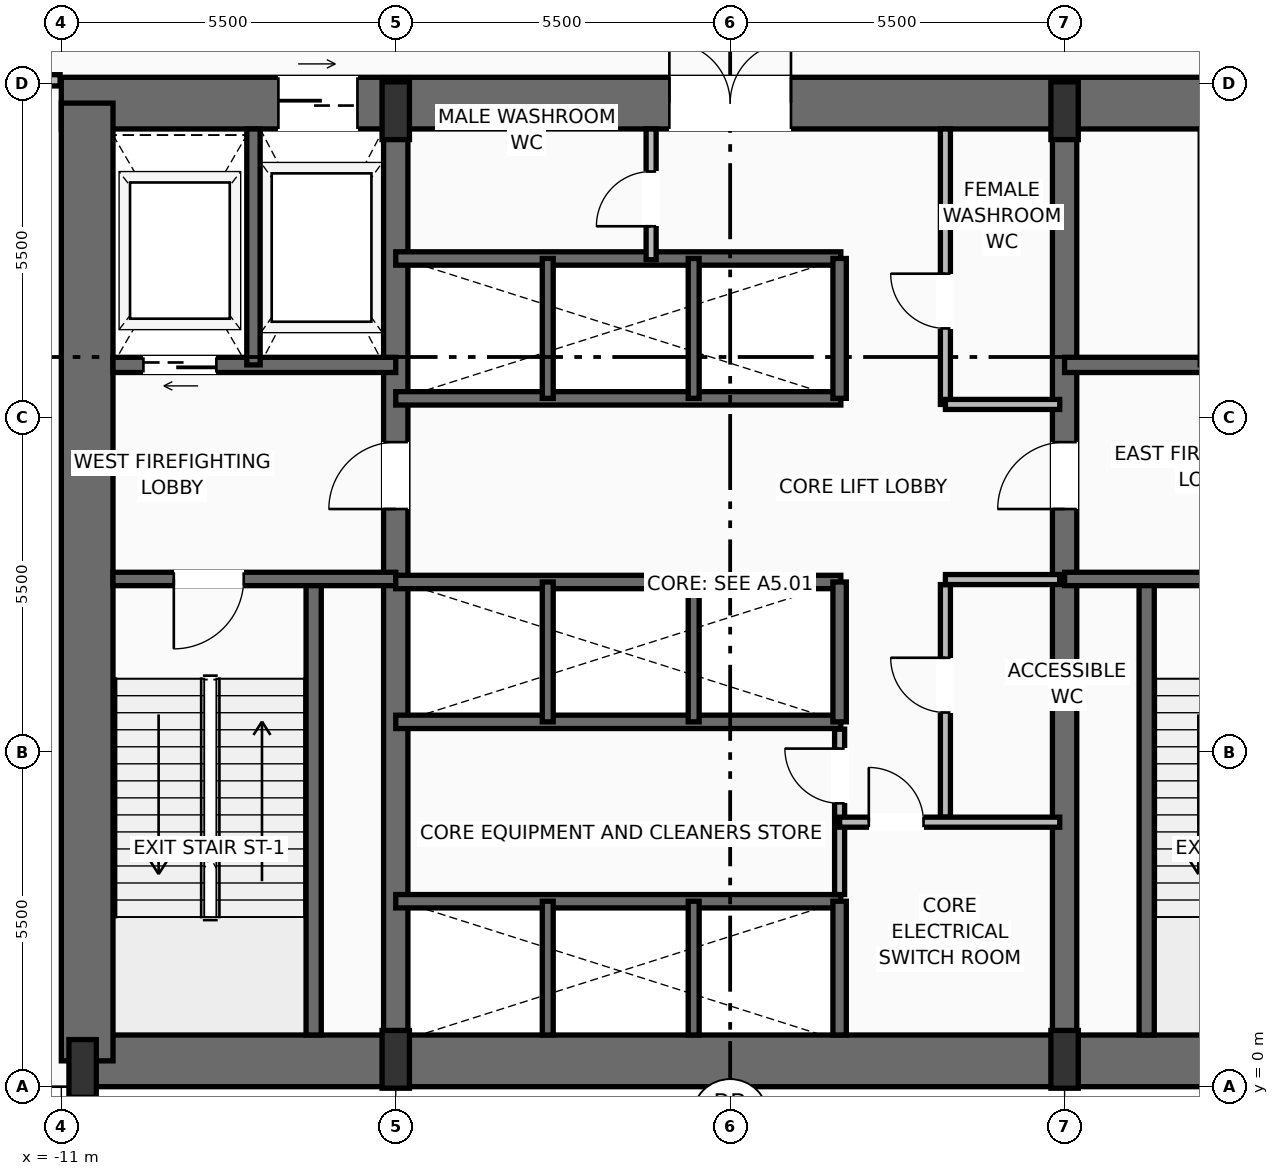
"""IFC4 building model, lengths in metres.
Left out: names, types, materials, properties, quantities, classifications, styles, units other than length and angle.
Written with IfcOpenShell. Run it as: python <this file> out.ifc"""

import sys

from ifc_helpers import new_model, si_unit, direction, frame, frame_2d, origin, origin_2d, place, context, subcontext, project, spatial, rectangle, extrude, source, transform, mapped, element, fill, save


model = new_model("IFC4")
c1 = context("Model", 3, precision=1e-05, world=origin(), true_north=direction((0.0, 1.0)))
c2 = subcontext(c1, "Body", "Model", "MODEL_VIEW")
j1 = project(units=[si_unit("LENGTHUNIT", "METRE"), si_unit("PLANEANGLEUNIT", "RADIAN")], contexts=[c1])
p1 = place(None, origin())
s1 = spatial("IfcSite", under=j1, at=p1, CompositionType="ELEMENT")
p2 = place(p1, origin())
s2 = spatial("IfcBuilding", under=s1, at=p2, CompositionType="ELEMENT")
p3 = place(p2, frame((0.0, 0.0, -5.0)))
s3 = spatial("IfcBuildingStorey", under=s2, at=p3, CompositionType="ELEMENT", Elevation=-5.0)
p4 = place(p3, frame((-10.65, 0.425, 0.0), z_axis=(0.0, 0.0, 1.0), x_axis=(1.0, 0.0, 0.0)))
e1 = element("IfcWall", 1, at=p4, inside=s3, PredefinedType="SHEAR", context=c2, shape_type="SweptSolid", body=[
    extrude(rectangle(XDim=21.3, YDim=0.85, at=frame_2d((10.65, 0.0))), origin(), (0.0, 0.0, 1.0), 4.64),
])
p5 = place(p3, frame((-11.0, 16.175, 0.0), z_axis=(0.0, 0.0, 1.0), x_axis=(1.0, 0.0, 0.0)))
e2 = element("IfcWall", 2, at=p5, inside=s3, PredefinedType="SHEAR", context=c2, shape_type="SweptSolid", body=[
    extrude(rectangle(XDim=22.0, YDim=0.85, at=frame_2d((11.0, 0.0))), origin(), (0.0, 0.0, 1.0), 4.64),
])
p6 = place(p5, frame((3.57, 0.0, 0.0)))
e3 = element("IfcOpeningElement", 3, at=p6, cuts=e2, PredefinedType="OPENING", context=c2, shape_type="SweptSolid", body=[
    extrude(rectangle(XDim=1.3, YDim=2.3, at=frame_2d((0.65, 1.15))), frame((0.0, 0.435, 0.0), z_axis=(0.0, -1.0, 0.0), x_axis=(1.0, 0.0, 0.0)), (0.0, 0.0, 1.0), 0.87),
])
p7 = place(p5, frame((10.0, 0.0, 0.0)))
e4 = element("IfcOpeningElement", 4, at=p7, cuts=e2, PredefinedType="OPENING", context=c2, shape_type="SweptSolid", body=[
    extrude(rectangle(XDim=2.0, YDim=2.4, at=frame_2d((1.0, 1.2))), frame((0.0, 0.435, 0.0), z_axis=(0.0, -1.0, 0.0), x_axis=(1.0, 0.0, 0.0)), (0.0, 0.0, 1.0), 0.87),
])
p8 = place(p3, frame((-10.575, 0.425, 0.0), z_axis=(0.0, 0.0, 1.0), x_axis=(0.0, 1.0, 0.0)))
e5 = element("IfcWall", 5, at=p8, inside=s3, PredefinedType="SHEAR", context=c2, shape_type="SweptSolid", body=[
    extrude(rectangle(XDim=15.75, YDim=0.85, at=frame_2d((7.875, 0.0))), origin(), (0.0, 0.0, 1.0), 4.64),
])
p9 = place(p3, frame((-5.5, 0.425, 0.0), z_axis=(0.0, 0.0, 1.0), x_axis=(0.0, 1.0, 0.0)))
e6 = element("IfcWall", 6, at=p9, inside=s3, PredefinedType="SHEAR", context=c2, shape_type="SweptSolid", body=[
    extrude(rectangle(XDim=15.75, YDim=0.4, at=frame_2d((7.875, 0.0))), origin(), (0.0, 0.0, 1.0), 4.64),
])
p10 = place(p9, frame((9.075, 0.0, 0.0)))
e7 = element("IfcOpeningElement", 7, at=p10, cuts=e6, PredefinedType="OPENING", context=c2, shape_type="SweptSolid", body=[
    extrude(rectangle(XDim=1.1, YDim=2.2, at=frame_2d((0.55, 1.1))), frame((0.0, 0.21, 0.0), z_axis=(0.0, -1.0, 0.0), x_axis=(1.0, 0.0, 0.0)), (0.0, 0.0, 1.0), 0.42),
])
p11 = place(p3, frame((5.5, 0.425, 0.0), z_axis=(0.0, 0.0, 1.0), x_axis=(0.0, 1.0, 0.0)))
e8 = element("IfcWall", 8, at=p11, inside=s3, PredefinedType="SHEAR", context=c2, shape_type="SweptSolid", body=[
    extrude(rectangle(XDim=15.75, YDim=0.4, at=frame_2d((7.875, 0.0))), origin(), (0.0, 0.0, 1.0), 4.64),
])
p12 = place(p11, frame((9.075, 0.0, 0.0)))
e9 = element("IfcOpeningElement", 9, at=p12, cuts=e8, PredefinedType="OPENING", context=c2, shape_type="SweptSolid", body=[
    extrude(rectangle(XDim=1.1, YDim=2.2, at=frame_2d((0.55, 1.1))), frame((0.0, 0.21, 0.0), z_axis=(0.0, -1.0, 0.0), x_axis=(1.0, 0.0, 0.0)), (0.0, 0.0, 1.0), 0.42),
])
m1 = source(origin(), c2, "Body", "SweptSolid", [
    extrude(rectangle(XDim=0.45, YDim=0.95, at=origin_2d()), origin(), (0.0, 0.0, 1.0), 5.0),
])
for number, where, z_axis, x_axis in (
    (10, (-10.65, 0.3, 0.0), (0.0, 0.0, 1.0), (1.0, 0.0, 0.0)),
    (11, (-5.5, 0.45, 0.0), (0.0, 0.0, 1.0), (1.0, 0.0, 0.0)),
    (12, (5.5, 0.45, 0.0), (0.0, 0.0, 1.0), (1.0, 0.0, 0.0)),
    (13, (-5.5, 16.05, 0.0), (0.0, 0.0, 1.0), (1.0, 0.0, 0.0)),
    (14, (5.5, 16.05, 0.0), (0.0, 0.0, 1.0), (1.0, 0.0, 0.0)),
):
    element("IfcColumn", number, at=place(p3, frame(where, z_axis=z_axis, x_axis=x_axis)), inside=s3, PredefinedType="PILASTER", context=c2, shape_type="MappedRepresentation", body=[
        mapped(m1, transform((0.0, 0.0, 0.0), scale=1.0)),
    ])
p13 = place(p3, frame((-6.85, 0.85, 0.0), z_axis=(0.0, 0.0, 1.0), x_axis=(0.0, 1.0, 0.0)))
e15 = element("IfcWall", 15, at=p13, inside=s3, PredefinedType="SOLIDWALL", context=c2, shape_type="SweptSolid", body=[
    extrude(rectangle(XDim=7.5, YDim=0.25, at=frame_2d((3.75, 0.0))), origin(), (0.0, 0.0, 1.0), 4.64),
])
p14 = place(p3, frame((-5.5, 8.35, 0.0), z_axis=(0.0, 0.0, 1.0), x_axis=(-1.0, 0.0, 0.0)))
e16 = element("IfcWall", 16, at=p14, inside=s3, PredefinedType="SOLIDWALL", context=c2, shape_type="SweptSolid", body=[
    extrude(rectangle(XDim=4.65, YDim=0.22, at=frame_2d((2.325, 0.0))), origin(), (0.0, 0.0, 1.0), 4.64),
])
p15 = place(p14, frame((2.5, 0.0, 0.0)))
e17 = element("IfcOpeningElement", 17, at=p15, cuts=e16, PredefinedType="OPENING", context=c2, shape_type="SweptSolid", body=[
    extrude(rectangle(XDim=1.15, YDim=2.2, at=frame_2d((0.575, 1.1))), frame((0.0, 0.12, 0.0), z_axis=(0.0, -1.0, 0.0), x_axis=(1.0, 0.0, 0.0)), (0.0, 0.0, 1.0), 0.24),
])
p16 = place(p3, frame((-5.5, 11.87, 0.0), z_axis=(0.0, 0.0, 1.0), x_axis=(-1.0, 0.0, 0.0)))
e18 = element("IfcWall", 18, at=p16, inside=s3, PredefinedType="SOLIDWALL", context=c2, shape_type="SweptSolid", body=[
    extrude(rectangle(XDim=4.65, YDim=0.25, at=frame_2d((2.325, 0.0))), origin(), (0.0, 0.0, 1.0), 4.64),
])
p17 = place(p16, frame((2.95, 0.0, 0.0)))
e19 = element("IfcOpeningElement", 19, at=p17, cuts=e18, PredefinedType="OPENING", context=c2, shape_type="SweptSolid", body=[
    extrude(rectangle(XDim=1.2, YDim=2.25, at=frame_2d((0.6, 1.125))), frame((0.0, 0.135, 0.0), z_axis=(0.0, -1.0, 0.0), x_axis=(1.0, 0.0, 0.0)), (0.0, 0.0, 1.0), 0.27),
])
p18 = place(p3, frame((-7.84, 11.87, 0.0), z_axis=(0.0, 0.0, 1.0), x_axis=(0.0, 1.0, 0.0)))
e20 = element("IfcWall", 20, at=p18, inside=s3, PredefinedType="SOLIDWALL", context=c2, shape_type="SweptSolid", body=[
    extrude(rectangle(XDim=3.88, YDim=0.22, at=frame_2d((1.94, 0.0))), origin(), (0.0, 0.0, 1.0), 4.64),
])
p19 = place(p3, frame((6.85, 0.85, 0.0), z_axis=(0.0, 0.0, 1.0), x_axis=(0.0, 1.0, 0.0)))
e21 = element("IfcWall", 21, at=p19, inside=s3, PredefinedType="SOLIDWALL", context=c2, shape_type="SweptSolid", body=[
    extrude(rectangle(XDim=7.5, YDim=0.25, at=frame_2d((3.75, 0.0))), origin(), (0.0, 0.0, 1.0), 4.64),
])
p20 = place(p3, frame((10.15, 8.35, 0.0), z_axis=(0.0, 0.0, 1.0), x_axis=(-1.0, 0.0, 0.0)))
e22 = element("IfcWall", 22, at=p20, inside=s3, PredefinedType="SOLIDWALL", context=c2, shape_type="SweptSolid", body=[
    extrude(rectangle(XDim=4.65, YDim=0.22, at=frame_2d((2.325, 0.0))), origin(), (0.0, 0.0, 1.0), 4.64),
])
p21 = place(p20, frame((1.0, 0.0, 0.0)))
e23 = element("IfcOpeningElement", 23, at=p21, cuts=e22, PredefinedType="OPENING", context=c2, shape_type="SweptSolid", body=[
    extrude(rectangle(XDim=1.15, YDim=2.2, at=frame_2d((0.575, 1.1))), frame((0.0, 0.12, 0.0), z_axis=(0.0, -1.0, 0.0), x_axis=(1.0, 0.0, 0.0)), (0.0, 0.0, 1.0), 0.24),
])
p22 = place(p3, frame((10.15, 11.87, 0.0), z_axis=(0.0, 0.0, 1.0), x_axis=(-1.0, 0.0, 0.0)))
e24 = element("IfcWall", 24, at=p22, inside=s3, PredefinedType="SOLIDWALL", context=c2, shape_type="SweptSolid", body=[
    extrude(rectangle(XDim=4.65, YDim=0.25, at=frame_2d((2.325, 0.0))), origin(), (0.0, 0.0, 1.0), 4.64),
])
p23 = place(p22, frame((0.5, 0.0, 0.0)))
e25 = element("IfcOpeningElement", 25, at=p23, cuts=e24, PredefinedType="OPENING", context=c2, shape_type="SweptSolid", body=[
    extrude(rectangle(XDim=1.2, YDim=2.25, at=frame_2d((0.6, 1.125))), frame((0.0, 0.135, 0.0), z_axis=(0.0, -1.0, 0.0), x_axis=(1.0, 0.0, 0.0)), (0.0, 0.0, 1.0), 0.27),
])
p24 = place(p3, frame((-5.5, 3.05, 0.0), z_axis=(0.0, 0.0, 1.0), x_axis=(1.0, 0.0, 0.0)))
e26 = element("IfcWall", 26, at=p24, inside=s3, PredefinedType="SOLIDWALL", context=c2, shape_type="SweptSolid", body=[
    extrude(rectangle(XDim=7.32, YDim=0.22, at=frame_2d((3.66, 0.0))), origin(), (0.0, 0.0, 1.0), 4.64),
])
p25 = place(p3, frame((1.8, 0.85, 0.0), z_axis=(0.0, 0.0, 1.0), x_axis=(0.0, 1.0, 0.0)))
e27 = element("IfcWall", 27, at=p25, inside=s3, PredefinedType="SOLIDWALL", context=c2, shape_type="SweptSolid", body=[
    extrude(rectangle(XDim=2.2, YDim=0.22, at=frame_2d((1.1, 0.0))), origin(), (0.0, 0.0, 1.0), 4.64),
])
for number, where, z_axis, x_axis in (
    (28, (-3.0, 0.85, 0.0), (0.0, 0.0, 1.0), (0.0, 1.0, 0.0)),
    (29, (-0.6, 0.85, 0.0), (0.0, 0.0, 1.0), (0.0, 1.0, 0.0)),
):
    element("IfcWall", number, at=place(p3, frame(where, z_axis=z_axis, x_axis=x_axis)), inside=s3, PredefinedType="SOLIDWALL", context=c2, shape_type="SweptSolid", body=[
        extrude(rectangle(XDim=2.2, YDim=0.18, at=frame_2d((1.1, 0.0))), origin(), (0.0, 0.0, 1.0), 4.64),
    ])
p26 = place(p3, frame((1.8, 3.16, 0.0), z_axis=(0.0, 0.0, 1.0), x_axis=(0.0, 1.0, 0.0)))
e30 = element("IfcWall", 30, at=p26, inside=s3, PredefinedType="PARTITIONING", context=c2, shape_type="SweptSolid", body=[
    extrude(rectangle(XDim=2.72, YDim=0.165, at=frame_2d((1.36, 0.0))), origin(), (0.0, 0.0, 1.0), 4.632),
])
p27 = place(p26, frame((1.5, 0.0, 0.0)))
e31 = element("IfcOpeningElement", 31, at=p27, cuts=e30, PredefinedType="OPENING", context=c2, shape_type="SweptSolid", body=[
    extrude(rectangle(XDim=0.9, YDim=2.1, at=frame_2d((0.45, 1.05))), frame((0.0, 0.093, 0.0), z_axis=(0.0, -1.0, 0.0), x_axis=(1.0, 0.0, 0.0)), (0.0, 0.0, 1.0), 0.185),
])
p28 = place(p3, frame((3.54, 4.433, 0.0), z_axis=(0.0, 0.0, 1.0), x_axis=(0.0, 1.0, 0.0)))
e32 = element("IfcWall", 32, at=p28, inside=s3, PredefinedType="PARTITIONING", context=c2, shape_type="SweptSolid", body=[
    extrude(rectangle(XDim=3.825, YDim=0.165, at=frame_2d((1.913, 0.0))), origin(), (0.0, 0.0, 1.0), 4.632),
])
p29 = place(p28, frame((1.721, 0.0, 0.0)))
e33 = element("IfcOpeningElement", 33, at=p29, cuts=e32, PredefinedType="OPENING", context=c2, shape_type="SweptSolid", body=[
    extrude(rectangle(XDim=0.9, YDim=2.1, at=frame_2d((0.45, 1.05))), frame((0.0, 0.093, 0.0), z_axis=(0.0, -1.0, 0.0), x_axis=(1.0, 0.0, 0.0)), (0.0, 0.0, 1.0), 0.185),
])
p30 = place(p3, frame((3.54, 8.34, 0.0), z_axis=(0.0, 0.0, 1.0), x_axis=(1.0, 0.0, 0.0)))
e34 = element("IfcWall", 34, at=p30, inside=s3, PredefinedType="PARTITIONING", context=c2, shape_type="SweptSolid", body=[
    extrude(rectangle(XDim=1.88, YDim=0.165, at=frame_2d((0.94, 0.0))), origin(), (0.0, 0.0, 1.0), 4.632),
])
p31 = place(p3, frame((1.8, 4.35, 0.0), z_axis=(0.0, 0.0, 1.0), x_axis=(1.0, 0.0, 0.0)))
e35 = element("IfcWall", 35, at=p31, inside=s3, PredefinedType="PARTITIONING", context=c2, shape_type="SweptSolid", body=[
    extrude(rectangle(XDim=3.62, YDim=0.165, at=frame_2d((1.81, 0.0))), origin(), (0.0, 0.0, 1.0), 4.632),
])
p32 = place(p31, frame((0.48, 0.0, 0.0)))
e36 = element("IfcOpeningElement", 36, at=p32, cuts=e35, PredefinedType="OPENING", context=c2, shape_type="SweptSolid", body=[
    extrude(rectangle(XDim=0.9, YDim=2.1, at=frame_2d((0.45, 1.05))), frame((0.0, 0.093, 0.0), z_axis=(0.0, -1.0, 0.0), x_axis=(1.0, 0.0, 0.0)), (0.0, 0.0, 1.0), 0.185),
])
for number, where, z_axis, x_axis in (
    (37, (-5.5, 6.0, 0.0), (0.0, 0.0, 1.0), (1.0, 0.0, 0.0)),
    (38, (-5.5, 8.3, 0.0), (0.0, 0.0, 1.0), (1.0, 0.0, 0.0)),
):
    element("IfcWall", number, at=place(p3, frame(where, z_axis=z_axis, x_axis=x_axis)), inside=s3, PredefinedType="SOLIDWALL", context=c2, shape_type="SweptSolid", body=[
        extrude(rectangle(XDim=7.32, YDim=0.22, at=frame_2d((3.66, 0.0))), origin(), (0.0, 0.0, 1.0), 4.64),
    ])
p33 = place(p3, frame((1.8, 6.0, 0.0), z_axis=(0.0, 0.0, 1.0), x_axis=(0.0, 1.0, 0.0)))
e39 = element("IfcWall", 39, at=p33, inside=s3, PredefinedType="SOLIDWALL", context=c2, shape_type="SweptSolid", body=[
    extrude(rectangle(XDim=2.3, YDim=0.22, at=frame_2d((1.15, 0.0))), origin(), (0.0, 0.0, 1.0), 4.64),
])
for number, where, z_axis, x_axis in (
    (40, (-3.0, 6.0, 0.0), (0.0, 0.0, 1.0), (0.0, 1.0, 0.0)),
    (41, (-0.6, 6.0, 0.0), (0.0, 0.0, 1.0), (0.0, 1.0, 0.0)),
):
    element("IfcWall", number, at=place(p3, frame(where, z_axis=z_axis, x_axis=x_axis)), inside=s3, PredefinedType="SOLIDWALL", context=c2, shape_type="SweptSolid", body=[
        extrude(rectangle(XDim=2.3, YDim=0.18, at=frame_2d((1.15, 0.0))), origin(), (0.0, 0.0, 1.0), 4.64),
    ])
for number, where, z_axis, x_axis in (
    (42, (-5.5, 11.32, 0.0), (0.0, 0.0, 1.0), (1.0, 0.0, 0.0)),
    (43, (-5.5, 13.62, 0.0), (0.0, 0.0, 1.0), (1.0, 0.0, 0.0)),
):
    element("IfcWall", number, at=place(p3, frame(where, z_axis=z_axis, x_axis=x_axis)), inside=s3, PredefinedType="SOLIDWALL", context=c2, shape_type="SweptSolid", body=[
        extrude(rectangle(XDim=7.32, YDim=0.22, at=frame_2d((3.66, 0.0))), origin(), (0.0, 0.0, 1.0), 4.64),
    ])
p34 = place(p3, frame((1.8, 11.32, 0.0), z_axis=(0.0, 0.0, 1.0), x_axis=(0.0, 1.0, 0.0)))
e44 = element("IfcWall", 44, at=p34, inside=s3, PredefinedType="SOLIDWALL", context=c2, shape_type="SweptSolid", body=[
    extrude(rectangle(XDim=2.3, YDim=0.22, at=frame_2d((1.15, 0.0))), origin(), (0.0, 0.0, 1.0), 4.64),
])
for number, where, z_axis, x_axis in (
    (45, (-3.0, 11.32, 0.0), (0.0, 0.0, 1.0), (0.0, 1.0, 0.0)),
    (46, (-0.6, 11.32, 0.0), (0.0, 0.0, 1.0), (0.0, 1.0, 0.0)),
):
    element("IfcWall", number, at=place(p3, frame(where, z_axis=z_axis, x_axis=x_axis)), inside=s3, PredefinedType="SOLIDWALL", context=c2, shape_type="SweptSolid", body=[
        extrude(rectangle(XDim=2.3, YDim=0.18, at=frame_2d((1.15, 0.0))), origin(), (0.0, 0.0, 1.0), 4.64),
    ])
p35 = place(p3, frame((-1.3, 13.6, 0.0), z_axis=(0.0, 0.0, 1.0), x_axis=(0.0, 1.0, 0.0)))
e47 = element("IfcWall", 47, at=p35, inside=s3, PredefinedType="PARTITIONING", context=c2, shape_type="SweptSolid", body=[
    extrude(rectangle(XDim=2.15, YDim=0.165, at=frame_2d((1.075, 0.0))), origin(), (0.0, 0.0, 1.0), 4.632),
])
p36 = place(p35, frame((0.55, 0.0, 0.0)))
e48 = element("IfcOpeningElement", 48, at=p36, cuts=e47, PredefinedType="OPENING", context=c2, shape_type="SweptSolid", body=[
    extrude(rectangle(XDim=0.9, YDim=2.1, at=frame_2d((0.45, 1.05))), frame((0.0, 0.093, 0.0), z_axis=(0.0, -1.0, 0.0), x_axis=(1.0, 0.0, 0.0)), (0.0, 0.0, 1.0), 0.185),
])
p37 = place(p3, frame((3.54, 11.22, 0.0), z_axis=(0.0, 0.0, 1.0), x_axis=(0.0, 1.0, 0.0)))
e49 = element("IfcWall", 49, at=p37, inside=s3, PredefinedType="PARTITIONING", context=c2, shape_type="SweptSolid", body=[
    extrude(rectangle(XDim=4.53, YDim=0.165, at=frame_2d((2.265, 0.0))), origin(), (0.0, 0.0, 1.0), 4.632),
])
p38 = place(p37, frame((1.25, 0.0, 0.0)))
e50 = element("IfcOpeningElement", 50, at=p38, cuts=e49, PredefinedType="OPENING", context=c2, shape_type="SweptSolid", body=[
    extrude(rectangle(XDim=0.9, YDim=2.1, at=frame_2d((0.45, 1.05))), frame((0.0, 0.093, 0.0), z_axis=(0.0, -1.0, 0.0), x_axis=(1.0, 0.0, 0.0)), (0.0, 0.0, 1.0), 0.185),
])
p39 = place(p3, frame((3.54, 11.22, 0.0), z_axis=(0.0, 0.0, 1.0), x_axis=(1.0, 0.0, 0.0)))
e51 = element("IfcWall", 51, at=p39, inside=s3, PredefinedType="PARTITIONING", context=c2, shape_type="SweptSolid", body=[
    extrude(rectangle(XDim=1.88, YDim=0.165, at=frame_2d((0.94, 0.0))), origin(), (0.0, 0.0, 1.0), 4.632),
])
p40 = place(p3, frame((-36.49, 16.55, 0.0), z_axis=(0.0, 0.0, 1.0), x_axis=(1.0, 0.0, 0.0)))
e52 = element("IfcWall", 52, at=p40, inside=s3, PredefinedType="PARTITIONING", context=c2, shape_type="SweptSolid", body=[
    extrude(rectangle(XDim=25.47, YDim=0.185, at=frame_2d((12.735, 0.0))), origin(), (0.0, 0.0, 1.0), 3.592),
])
p41 = place(p40, frame((11.985, 0.0, 0.0)))
e53 = element("IfcOpeningElement", 53, at=p41, cuts=e52, PredefinedType="OPENING", context=c2, shape_type="SweptSolid", body=[
    extrude(rectangle(XDim=1.5, YDim=2.25, at=frame_2d((0.75, 1.125))), frame((0.0, 0.103, 0.0), z_axis=(0.0, -1.0, 0.0), x_axis=(1.0, 0.0, 0.0)), (0.0, 0.0, 1.0), 0.205),
])
m2 = source(origin(), c2, "Body", "SweptSolid", [
    extrude(rectangle(XDim=1.15, YDim=2.2, at=frame_2d((0.575, 1.1))), frame((0.0, 0.025, 0.0), z_axis=(0.0, -1.0, 0.0), x_axis=(1.0, 0.0, 0.0)), (0.0, 0.0, 1.0), 0.05),
])
p42 = place(p15, origin())
e54 = element("IfcDoor", 54, at=p42, inside=s3, OperationType="SINGLE_SWING_RIGHT", PredefinedType="DOOR", context=c2, shape_type="MappedRepresentation", body=[
    mapped(m2, transform((0.0, 0.0, 0.0), scale=1.0)),
])
fill(e17, e54)
m3 = source(origin(), c2, "Body", "SweptSolid", [
    extrude(rectangle(XDim=1.1, YDim=2.2, at=frame_2d((0.55, 1.1))), frame((0.0, 0.025, 0.0), z_axis=(0.0, -1.0, 0.0), x_axis=(1.0, 0.0, 0.0)), (0.0, 0.0, 1.0), 0.05),
])
p43 = place(p10, origin())
e55 = element("IfcDoor", 55, at=p43, inside=s3, OperationType="SINGLE_SWING_LEFT", PredefinedType="DOOR", context=c2, shape_type="MappedRepresentation", body=[
    mapped(m3, transform((0.0, 0.0, 0.0), scale=1.0)),
])
fill(e7, e55)
m4 = source(origin(), c2, "Body", "SweptSolid", [
    extrude(rectangle(XDim=1.2, YDim=2.25, at=frame_2d((0.6, 1.125))), frame((0.0, 0.025, 0.0), z_axis=(0.0, -1.0, 0.0), x_axis=(1.0, 0.0, 0.0)), (0.0, 0.0, 1.0), 0.05),
])
p44 = place(p17, origin())
e56 = element("IfcDoor", 56, at=p44, inside=s3, OperationType="SLIDING_TO_LEFT", PredefinedType="DOOR", context=c2, shape_type="MappedRepresentation", body=[
    mapped(m4, transform((0.0, 0.0, 0.0), scale=1.0)),
])
fill(e19, e56)
m5 = source(origin(), c2, "Body", "SweptSolid", [
    extrude(rectangle(XDim=1.3, YDim=2.3, at=frame_2d((0.65, 1.15))), frame((0.0, 0.025, 0.0), z_axis=(0.0, -1.0, 0.0), x_axis=(1.0, 0.0, 0.0)), (0.0, 0.0, 1.0), 0.05),
])
p45 = place(p6, origin())
e57 = element("IfcDoor", 57, at=p45, inside=s3, OperationType="SLIDING_TO_RIGHT", PredefinedType="DOOR", context=c2, shape_type="MappedRepresentation", body=[
    mapped(m5, transform((0.0, 0.0, 0.0), scale=1.0)),
])
fill(e3, e57)
p46 = place(p12, origin())
e58 = element("IfcDoor", 58, at=p46, inside=s3, OperationType="SINGLE_SWING_LEFT", PredefinedType="DOOR", context=c2, shape_type="MappedRepresentation", body=[
    mapped(m3, transform((0.0, 0.0, 0.0), scale=1.0)),
])
fill(e9, e58)
m6 = source(origin(), c2, "Body", "SweptSolid", [
    extrude(rectangle(XDim=2.0, YDim=2.4, at=frame_2d((1.0, 1.2))), frame((0.0, 0.025, 0.0), z_axis=(0.0, -1.0, 0.0), x_axis=(1.0, 0.0, 0.0)), (0.0, 0.0, 1.0), 0.05),
])
p47 = place(p7, origin())
e59 = element("IfcDoor", 59, at=p47, inside=s3, OperationType="DOUBLE_DOOR_SINGLE_SWING", PredefinedType="DOOR", context=c2, shape_type="MappedRepresentation", body=[
    mapped(m6, transform((0.0, 0.0, 0.0), scale=1.0)),
])
fill(e4, e59)
m7 = source(origin(), c2, "Body", "SweptSolid", [
    extrude(rectangle(XDim=0.9, YDim=2.1, at=frame_2d((0.45, 1.05))), frame((0.0, 0.025, 0.0), z_axis=(0.0, -1.0, 0.0), x_axis=(1.0, 0.0, 0.0)), (0.0, 0.0, 1.0), 0.05),
])
p48 = place(p27, origin())
e60 = element("IfcDoor", 60, at=p48, inside=s3, OperationType="SINGLE_SWING_RIGHT", PredefinedType="DOOR", context=c2, shape_type="MappedRepresentation", body=[
    mapped(m7, transform((0.0, 0.0, 0.0), scale=1.0)),
])
fill(e31, e60)
p49 = place(p32, origin())
e61 = element("IfcDoor", 61, at=p49, inside=s3, OperationType="SINGLE_SWING_LEFT", PredefinedType="DOOR", context=c2, shape_type="MappedRepresentation", body=[
    mapped(m7, transform((0.0, 0.0, 0.0), scale=1.0)),
])
fill(e36, e61)
p50 = place(p29, origin())
e62 = element("IfcDoor", 62, at=p50, inside=s3, OperationType="SINGLE_SWING_RIGHT", PredefinedType="DOOR", context=c2, shape_type="MappedRepresentation", body=[
    mapped(m7, transform((0.0, 0.0, 0.0), scale=1.0)),
])
fill(e33, e62)
p51 = place(p36, origin())
e63 = element("IfcDoor", 63, at=p51, inside=s3, OperationType="SINGLE_SWING_LEFT", PredefinedType="DOOR", context=c2, shape_type="MappedRepresentation", body=[
    mapped(m7, transform((0.0, 0.0, 0.0), scale=1.0)),
])
fill(e48, e63)
p52 = place(p38, origin())
e64 = element("IfcDoor", 64, at=p52, inside=s3, OperationType="SINGLE_SWING_RIGHT", PredefinedType="DOOR", context=c2, shape_type="MappedRepresentation", body=[
    mapped(m7, transform((0.0, 0.0, 0.0), scale=1.0)),
])
fill(e50, e64)
save(model, sys.argv[1])
